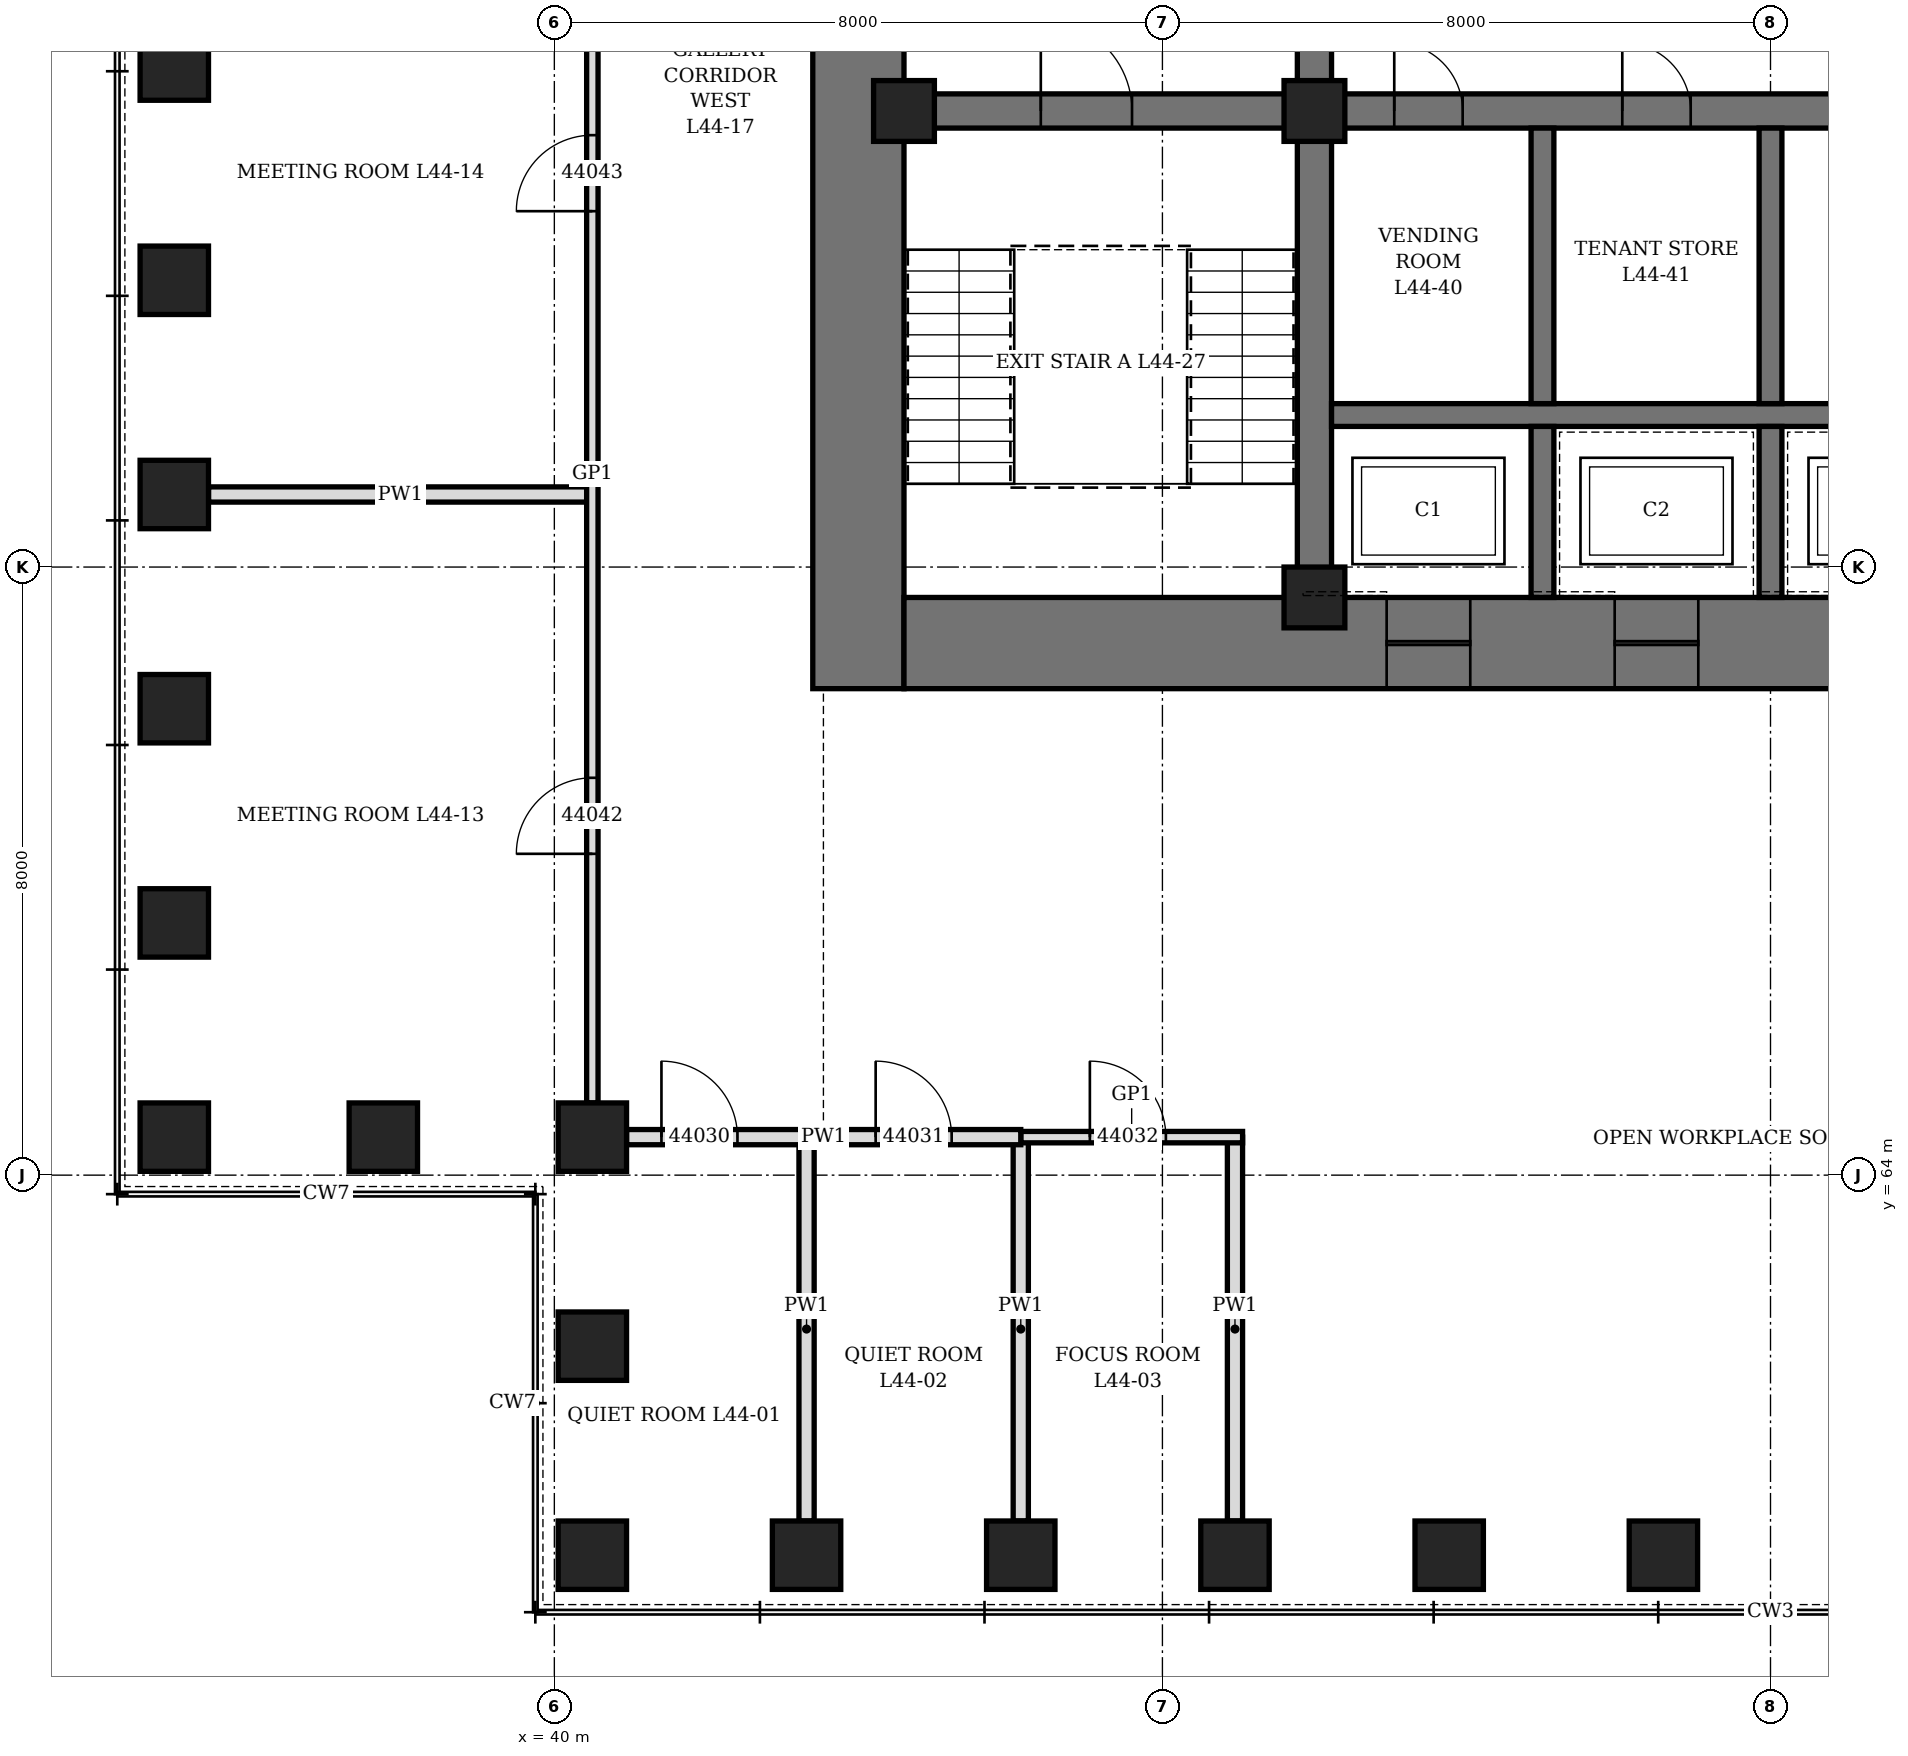
"""IFC4 building model, lengths in metres.
Left out: names, types, materials, properties, quantities, classifications, styles, units other than length and angle.
Written with IfcOpenShell. Run it as: python <this file> out.ifc"""

import sys

from ifc_helpers import new_model, si_unit, direction, frame, frame_2d, origin, origin_2d, place, context, subcontext, project, spatial, rectangle, hollow_rectangle, extrude, element, fill, save


model = new_model("IFC4")
c1 = context("Model", 3, precision=1e-05, world=origin(), true_north=direction((0.0, 1.0)))
c2 = subcontext(c1, "Body", "Model", "MODEL_VIEW")
j1 = project(units=[si_unit("LENGTHUNIT", "METRE"), si_unit("PLANEANGLEUNIT", "RADIAN")], contexts=[c1])
p1 = place(None, origin())
s1 = spatial("IfcSite", under=j1, at=p1, CompositionType="ELEMENT")
p2 = place(p1, origin())
s2 = spatial("IfcBuilding", under=s1, at=p2, CompositionType="ELEMENT")
p3 = place(p2, frame((0.0, 0.0, 198.1)))
s3 = spatial("IfcBuildingStorey", under=s2, at=p3, CompositionType="ELEMENT", Elevation=198.1)
for number, where, z_axis, x_axis in (
    (1, (40.5, 59.0, 0.0), (0.0, 0.0, 1.0), (1.0, 0.0, 0.0)),
    (2, (43.318, 59.0, 0.0), (0.0, 0.0, 1.0), (1.0, 0.0, 0.0)),
    (3, (46.136, 59.0, 0.0), (0.0, 0.0, 1.0), (1.0, 0.0, 0.0)),
    (4, (48.955, 59.0, 0.0), (0.0, 0.0, 1.0), (1.0, 0.0, 0.0)),
    (5, (51.773, 59.0, 0.0), (0.0, 0.0, 1.0), (1.0, 0.0, 0.0)),
    (6, (54.591, 59.0, 0.0), (0.0, 0.0, 1.0), (1.0, 0.0, 0.0)),
    (7, (35.0, 78.591, 0.0), (0.0, 0.0, 1.0), (0.0, 1.0, 0.0)),
    (8, (35.0, 75.773, 0.0), (0.0, 0.0, 1.0), (0.0, 1.0, 0.0)),
    (9, (35.0, 72.955, 0.0), (0.0, 0.0, 1.0), (0.0, 1.0, 0.0)),
    (10, (35.0, 70.136, 0.0), (0.0, 0.0, 1.0), (0.0, 1.0, 0.0)),
    (11, (35.0, 67.318, 0.0), (0.0, 0.0, 1.0), (0.0, 1.0, 0.0)),
    (12, (35.0, 64.5, 0.0), (0.0, 0.0, 1.0), (1.0, 0.0, 0.0)),
    (13, (37.75, 64.5, 0.0), (0.0, 0.0, 1.0), (1.0, 0.0, 0.0)),
    (14, (40.5, 64.5, 0.0), (0.0, 0.0, 1.0), (0.0, 1.0, 0.0)),
    (15, (40.5, 61.75, 0.0), (0.0, 0.0, 1.0), (0.0, 1.0, 0.0)),
):
    element("IfcColumn", number, at=place(p3, frame(where, z_axis=z_axis, x_axis=x_axis)), inside=s3, PredefinedType="COLUMN", context=c2, shape_type="SweptSolid", body=[
        extrude(hollow_rectangle(XDim=0.9, YDim=0.9, WallThickness=0.12, at=origin_2d()), origin(), (0.0, 0.0, 1.0), 4.2),
    ])
p4 = place(p3, frame((44.0, 70.4, 0.0), z_axis=(0.0, 0.0, 1.0), x_axis=(0.0, 1.0, 0.0)))
e16 = element("IfcWall", 16, at=p4, inside=s3, PredefinedType="SHEAR", context=c2, shape_type="SweptSolid", body=[
    extrude(rectangle(XDim=19.2, YDim=1.2, at=frame_2d((9.6, 0.0))), origin(), (0.0, 0.0, 1.0), 4.2),
])
p5 = place(p4, frame((8.6, 0.0, 0.0)))
e17 = element("IfcOpeningElement", 17, at=p5, cuts=e16, PredefinedType="OPENING", context=c2, shape_type="SweptSolid", body=[
    extrude(rectangle(XDim=2.0, YDim=2.4, at=frame_2d((1.0, 1.2))), frame((0.0, 0.61, 0.0), z_axis=(0.0, -1.0, 0.0), x_axis=(1.0, 0.0, 0.0)), (0.0, 0.0, 1.0), 1.22),
])
p6 = place(p3, frame((44.6, 71.0, 0.0), z_axis=(0.0, 0.0, 1.0), x_axis=(1.0, 0.0, 0.0)))
e18 = element("IfcWall", 18, at=p6, inside=s3, PredefinedType="SHEAR", context=c2, shape_type="SweptSolid", body=[
    extrude(rectangle(XDim=22.8, YDim=1.2, at=frame_2d((11.4, 0.0))), origin(), (0.0, 0.0, 1.0), 4.2),
])
p7 = place(p6, frame((6.35, 0.0, 0.0)))
e19 = element("IfcOpeningElement", 19, at=p7, cuts=e18, PredefinedType="OPENING", context=c2, shape_type="SweptSolid", body=[
    extrude(rectangle(XDim=1.1, YDim=2.2, at=frame_2d((0.55, 1.1))), frame((0.0, 0.61, 0.0), z_axis=(0.0, -1.0, 0.0), x_axis=(1.0, 0.0, 0.0)), (0.0, 0.0, 1.0), 1.22),
])
p8 = place(p6, frame((9.35, 0.0, 0.0)))
e20 = element("IfcOpeningElement", 20, at=p8, cuts=e18, PredefinedType="OPENING", context=c2, shape_type="SweptSolid", body=[
    extrude(rectangle(XDim=1.1, YDim=2.2, at=frame_2d((0.55, 1.1))), frame((0.0, 0.61, 0.0), z_axis=(0.0, -1.0, 0.0), x_axis=(1.0, 0.0, 0.0)), (0.0, 0.0, 1.0), 1.22),
])
p9 = place(p6, frame((12.35, 0.0, 0.0)))
e21 = element("IfcOpeningElement", 21, at=p9, cuts=e18, PredefinedType="OPENING", context=c2, shape_type="SweptSolid", body=[
    extrude(rectangle(XDim=1.1, YDim=2.2, at=frame_2d((0.55, 1.1))), frame((0.0, 0.61, 0.0), z_axis=(0.0, -1.0, 0.0), x_axis=(1.0, 0.0, 0.0)), (0.0, 0.0, 1.0), 1.22),
])
p10 = place(p6, frame((15.35, 0.0, 0.0)))
e22 = element("IfcOpeningElement", 22, at=p10, cuts=e18, PredefinedType="OPENING", context=c2, shape_type="SweptSolid", body=[
    extrude(rectangle(XDim=1.1, YDim=2.2, at=frame_2d((0.55, 1.1))), frame((0.0, 0.61, 0.0), z_axis=(0.0, -1.0, 0.0), x_axis=(1.0, 0.0, 0.0)), (0.0, 0.0, 1.0), 1.22),
])
p11 = place(p3, frame((50.0, 71.6, 0.0), z_axis=(0.0, 0.0, 1.0), x_axis=(0.0, 1.0, 0.0)))
e23 = element("IfcWall", 23, at=p11, inside=s3, PredefinedType="SHEAR", context=c2, shape_type="SweptSolid", body=[
    extrude(rectangle(XDim=16.8, YDim=0.45, at=frame_2d((8.4, 0.0))), origin(), (0.0, 0.0, 1.0), 4.2),
])
p12 = place(p11, frame((7.5, 0.0, 0.0)))
e24 = element("IfcOpeningElement", 24, at=p12, cuts=e23, PredefinedType="OPENING", context=c2, shape_type="SweptSolid", body=[
    extrude(rectangle(XDim=1.8, YDim=2.4, at=frame_2d((0.9, 1.2))), frame((0.0, 0.235, 0.0), z_axis=(0.0, -1.0, 0.0), x_axis=(1.0, 0.0, 0.0)), (0.0, 0.0, 1.0), 0.47),
])
p13 = place(p3, frame((44.6, 78.0, 0.0), z_axis=(0.0, 0.0, 1.0), x_axis=(1.0, 0.0, 0.0)))
e25 = element("IfcWall", 25, at=p13, inside=s3, PredefinedType="SHEAR", context=c2, shape_type="SweptSolid", body=[
    extrude(rectangle(XDim=5.175, YDim=0.45, at=frame_2d((2.587, 0.0))), origin(), (0.0, 0.0, 1.0), 4.2),
])
p14 = place(p13, frame((1.8, 0.0, 0.0)))
e26 = element("IfcOpeningElement", 26, at=p14, cuts=e25, PredefinedType="OPENING", context=c2, shape_type="SweptSolid", body=[
    extrude(rectangle(XDim=1.2, YDim=2.1, at=frame_2d((0.6, 1.05))), frame((0.0, 0.235, 0.0), z_axis=(0.0, -1.0, 0.0), x_axis=(1.0, 0.0, 0.0)), (0.0, 0.0, 1.0), 0.47),
])
p15 = place(p3, frame((50.225, 78.0, 0.0), z_axis=(0.0, 0.0, 1.0), x_axis=(1.0, 0.0, 0.0)))
e27 = element("IfcWall", 27, at=p15, inside=s3, PredefinedType="SHEAR", context=c2, shape_type="SweptSolid", body=[
    extrude(rectangle(XDim=11.55, YDim=0.45, at=frame_2d((5.775, 0.0))), origin(), (0.0, 0.0, 1.0), 4.2),
])
p16 = place(p15, frame((0.825, 0.0, 0.0)))
e28 = element("IfcOpeningElement", 28, at=p16, cuts=e27, PredefinedType="OPENING", context=c2, shape_type="SweptSolid", body=[
    extrude(rectangle(XDim=0.9, YDim=2.1, at=frame_2d((0.45, 1.05))), frame((0.0, 0.235, 0.0), z_axis=(0.0, -1.0, 0.0), x_axis=(1.0, 0.0, 0.0)), (0.0, 0.0, 1.0), 0.47),
])
p17 = place(p15, frame((3.825, 0.0, 0.0)))
e29 = element("IfcOpeningElement", 29, at=p17, cuts=e27, PredefinedType="OPENING", context=c2, shape_type="SweptSolid", body=[
    extrude(rectangle(XDim=0.9, YDim=2.1, at=frame_2d((0.45, 1.05))), frame((0.0, 0.235, 0.0), z_axis=(0.0, -1.0, 0.0), x_axis=(1.0, 0.0, 0.0)), (0.0, 0.0, 1.0), 0.47),
])
p18 = place(p15, frame((6.825, 0.0, 0.0)))
e30 = element("IfcOpeningElement", 30, at=p18, cuts=e27, PredefinedType="OPENING", context=c2, shape_type="SweptSolid", body=[
    extrude(rectangle(XDim=0.9, YDim=2.1, at=frame_2d((0.45, 1.05))), frame((0.0, 0.235, 0.0), z_axis=(0.0, -1.0, 0.0), x_axis=(1.0, 0.0, 0.0)), (0.0, 0.0, 1.0), 0.47),
])
p19 = place(p15, frame((9.825, 0.0, 0.0)))
e31 = element("IfcOpeningElement", 31, at=p19, cuts=e27, PredefinedType="OPENING", context=c2, shape_type="SweptSolid", body=[
    extrude(rectangle(XDim=0.9, YDim=2.1, at=frame_2d((0.45, 1.05))), frame((0.0, 0.235, 0.0), z_axis=(0.0, -1.0, 0.0), x_axis=(1.0, 0.0, 0.0)), (0.0, 0.0, 1.0), 0.47),
])
p20 = place(p3, frame((50.225, 74.0, 0.0), z_axis=(0.0, 0.0, 1.0), x_axis=(1.0, 0.0, 0.0)))
e32 = element("IfcWall", 32, at=p20, inside=s3, PredefinedType="SHEAR", context=c2, shape_type="SweptSolid", body=[
    extrude(rectangle(XDim=11.55, YDim=0.3, at=frame_2d((5.775, 0.0))), origin(), (0.0, 0.0, 1.0), 4.2),
])
p21 = place(p3, frame((53.0, 71.6, 0.0), z_axis=(0.0, 0.0, 1.0), x_axis=(0.0, 1.0, 0.0)))
e33 = element("IfcWall", 33, at=p21, inside=s3, PredefinedType="SHEAR", context=c2, shape_type="SweptSolid", body=[
    extrude(rectangle(XDim=2.25, YDim=0.3, at=frame_2d((1.125, 0.0))), origin(), (0.0, 0.0, 1.0), 4.2),
])
p22 = place(p3, frame((53.0, 74.15, 0.0), z_axis=(0.0, 0.0, 1.0), x_axis=(0.0, 1.0, 0.0)))
e34 = element("IfcWall", 34, at=p22, inside=s3, PredefinedType="SHEAR", context=c2, shape_type="SweptSolid", body=[
    extrude(rectangle(XDim=3.625, YDim=0.3, at=frame_2d((1.812, 0.0))), origin(), (0.0, 0.0, 1.0), 4.2),
])
p23 = place(p3, frame((56.0, 71.6, 0.0), z_axis=(0.0, 0.0, 1.0), x_axis=(0.0, 1.0, 0.0)))
e35 = element("IfcWall", 35, at=p23, inside=s3, PredefinedType="SHEAR", context=c2, shape_type="SweptSolid", body=[
    extrude(rectangle(XDim=2.25, YDim=0.3, at=frame_2d((1.125, 0.0))), origin(), (0.0, 0.0, 1.0), 4.2),
])
p24 = place(p3, frame((56.0, 74.15, 0.0), z_axis=(0.0, 0.0, 1.0), x_axis=(0.0, 1.0, 0.0)))
e36 = element("IfcWall", 36, at=p24, inside=s3, PredefinedType="SHEAR", context=c2, shape_type="SweptSolid", body=[
    extrude(rectangle(XDim=3.625, YDim=0.3, at=frame_2d((1.812, 0.0))), origin(), (0.0, 0.0, 1.0), 4.2),
])
for number, where, z_axis, x_axis in (
    (37, (44.6, 78.0, 0.0), (0.0, 0.0, 1.0), (1.0, 0.0, 0.0)),
    (38, (50.0, 71.6, 0.0), (0.0, 0.0, 1.0), (1.0, 0.0, 0.0)),
    (39, (50.0, 78.0, 0.0), (0.0, 0.0, 1.0), (1.0, 0.0, 0.0)),
):
    element("IfcColumn", number, at=place(p3, frame(where, z_axis=z_axis, x_axis=x_axis)), inside=s3, PredefinedType="COLUMN", context=c2, shape_type="SweptSolid", body=[
        extrude(hollow_rectangle(XDim=0.8, YDim=0.8, WallThickness=0.1, at=origin_2d()), origin(), (0.0, 0.0, 1.0), 4.2),
    ])
for number, where, z_axis, x_axis in (
    (40, (43.318, 59.45, 0.0), (0.0, 0.0, 1.0), (0.0, 1.0, 0.0)),
    (41, (46.136, 59.45, 0.0), (0.0, 0.0, 1.0), (0.0, 1.0, 0.0)),
    (42, (48.955, 59.45, 0.0), (0.0, 0.0, 1.0), (0.0, 1.0, 0.0)),
    (43, (35.45, 72.955, 0.0), (0.0, 0.0, 1.0), (1.0, 0.0, 0.0)),
):
    element("IfcWall", number, at=place(p3, frame(where, z_axis=z_axis, x_axis=x_axis)), inside=s3, PredefinedType="PARTITIONING", context=c2, shape_type="SweptSolid", body=[
        extrude(rectangle(XDim=5.05, YDim=0.2, at=frame_2d((2.525, 0.0))), origin(), (0.0, 0.0, 1.0), 3.428),
    ])
p25 = place(p3, frame((46.136, 64.5, 0.0), z_axis=(0.0, 0.0, 1.0), x_axis=(1.0, 0.0, 0.0)))
e44 = element("IfcWall", 44, at=p25, inside=s3, PredefinedType="PARTITIONING", context=c2, shape_type="SweptSolid", body=[
    extrude(rectangle(XDim=2.918, YDim=0.15, at=frame_2d((1.459, 0.0))), origin(), (0.0, 0.0, 1.0), 4.04),
])
p26 = place(p25, frame((0.909, 0.0, 0.0)))
e45 = element("IfcOpeningElement", 45, at=p26, cuts=e44, PredefinedType="OPENING", context=c2, shape_type="SweptSolid", body=[
    extrude(rectangle(XDim=1.0, YDim=2.4, at=frame_2d((0.5, 1.2))), frame((0.0, 0.085, 0.0), z_axis=(0.0, -1.0, 0.0), x_axis=(1.0, 0.0, 0.0)), (0.0, 0.0, 1.0), 0.17),
])
p27 = place(p3, frame((40.95, 64.5, 0.0), z_axis=(0.0, 0.0, 1.0), x_axis=(1.0, 0.0, 0.0)))
e46 = element("IfcWall", 46, at=p27, inside=s3, PredefinedType="PARTITIONING", context=c2, shape_type="SweptSolid", body=[
    extrude(rectangle(XDim=5.187, YDim=0.2, at=frame_2d((2.593, 0.0))), origin(), (0.0, 0.0, 1.0), 4.04),
])
p28 = place(p27, frame((0.459, 0.0, 0.0)))
e47 = element("IfcOpeningElement", 47, at=p28, cuts=e46, PredefinedType="OPENING", context=c2, shape_type="SweptSolid", body=[
    extrude(rectangle(XDim=1.0, YDim=2.1, at=frame_2d((0.5, 1.05))), frame((0.0, 0.11, 0.0), z_axis=(0.0, -1.0, 0.0), x_axis=(1.0, 0.0, 0.0)), (0.0, 0.0, 1.0), 0.22),
])
p29 = place(p27, frame((3.277, 0.0, 0.0)))
e48 = element("IfcOpeningElement", 48, at=p29, cuts=e46, PredefinedType="OPENING", context=c2, shape_type="SweptSolid", body=[
    extrude(rectangle(XDim=1.0, YDim=2.1, at=frame_2d((0.5, 1.05))), frame((0.0, 0.11, 0.0), z_axis=(0.0, -1.0, 0.0), x_axis=(1.0, 0.0, 0.0)), (0.0, 0.0, 1.0), 0.22),
])
p30 = place(p3, frame((40.5, 64.95, 0.0), z_axis=(0.0, 0.0, 1.0), x_axis=(0.0, 1.0, 0.0)))
e49 = element("IfcWall", 49, at=p30, inside=s3, PredefinedType="PARTITIONING", context=c2, shape_type="SweptSolid", body=[
    extrude(rectangle(XDim=16.559, YDim=0.15, at=frame_2d((8.28, 0.0))), origin(), (0.0, 0.0, 1.0), 4.04),
])
p31 = place(p30, frame((3.277, 0.0, 0.0)))
e50 = element("IfcOpeningElement", 50, at=p31, cuts=e49, PredefinedType="OPENING", context=c2, shape_type="SweptSolid", body=[
    extrude(rectangle(XDim=1.0, YDim=2.4, at=frame_2d((0.5, 1.2))), frame((0.0, 0.085, 0.0), z_axis=(0.0, -1.0, 0.0), x_axis=(1.0, 0.0, 0.0)), (0.0, 0.0, 1.0), 0.17),
])
p32 = place(p30, frame((11.732, 0.0, 0.0)))
e51 = element("IfcOpeningElement", 51, at=p32, cuts=e49, PredefinedType="OPENING", context=c2, shape_type="SweptSolid", body=[
    extrude(rectangle(XDim=1.0, YDim=2.4, at=frame_2d((0.5, 1.2))), frame((0.0, 0.085, 0.0), z_axis=(0.0, -1.0, 0.0), x_axis=(1.0, 0.0, 0.0)), (0.0, 0.0, 1.0), 0.17),
])
p33 = place(p16, origin())
e52 = element("IfcDoor", 52, at=p33, inside=s3, OperationType="SINGLE_SWING_LEFT", PredefinedType="DOOR", context=c2, shape_type="SweptSolid", body=[
    extrude(rectangle(XDim=0.9, YDim=2.1, at=frame_2d((0.45, 1.05))), frame((0.0, 0.225, 0.0), z_axis=(0.0, -1.0, 0.0), x_axis=(1.0, 0.0, 0.0)), (0.0, 0.0, 1.0), 0.449),
])
fill(e28, e52)
p34 = place(p17, origin())
e53 = element("IfcDoor", 53, at=p34, inside=s3, OperationType="SINGLE_SWING_LEFT", PredefinedType="DOOR", context=c2, shape_type="SweptSolid", body=[
    extrude(rectangle(XDim=0.9, YDim=2.1, at=frame_2d((0.45, 1.05))), frame((0.0, 0.225, 0.0), z_axis=(0.0, -1.0, 0.0), x_axis=(1.0, 0.0, 0.0)), (0.0, 0.0, 1.0), 0.449),
])
fill(e29, e53)
p35 = place(p14, origin())
e54 = element("IfcDoor", 54, at=p35, inside=s3, OperationType="SINGLE_SWING_LEFT", PredefinedType="DOOR", context=c2, shape_type="SweptSolid", body=[
    extrude(rectangle(XDim=1.2, YDim=2.1, at=frame_2d((0.6, 1.05))), frame((0.0, 0.225, 0.0), z_axis=(0.0, -1.0, 0.0), x_axis=(1.0, 0.0, 0.0)), (0.0, 0.0, 1.0), 0.449),
])
fill(e26, e54)
p36 = place(p7, origin())
e55 = element("IfcDoor", 55, at=p36, inside=s3, OperationType="SLIDING_TO_LEFT", PredefinedType="DOOR", context=c2, shape_type="SweptSolid", body=[
    extrude(rectangle(XDim=1.1, YDim=2.2, at=frame_2d((0.55, 1.1))), frame((0.0, 0.35, 0.0), z_axis=(0.0, -1.0, 0.0), x_axis=(1.0, 0.0, 0.0)), (0.0, 0.0, 1.0), 0.7),
])
fill(e19, e55)
p37 = place(p8, origin())
e56 = element("IfcDoor", 56, at=p37, inside=s3, OperationType="SLIDING_TO_LEFT", PredefinedType="DOOR", context=c2, shape_type="SweptSolid", body=[
    extrude(rectangle(XDim=1.1, YDim=2.2, at=frame_2d((0.55, 1.1))), frame((0.0, 0.35, 0.0), z_axis=(0.0, -1.0, 0.0), x_axis=(1.0, 0.0, 0.0)), (0.0, 0.0, 1.0), 0.7),
])
fill(e20, e56)
p38 = place(p28, origin())
e57 = element("IfcDoor", 57, at=p38, inside=s3, OperationType="SINGLE_SWING_LEFT", PredefinedType="DOOR", context=c2, shape_type="SweptSolid", body=[
    extrude(rectangle(XDim=1.0, YDim=2.1, at=frame_2d((0.5, 1.05))), frame((0.0, 0.1, 0.0), z_axis=(0.0, -1.0, 0.0), x_axis=(1.0, 0.0, 0.0)), (0.0, 0.0, 1.0), 0.199),
])
fill(e47, e57)
p39 = place(p29, origin())
e58 = element("IfcDoor", 58, at=p39, inside=s3, OperationType="SINGLE_SWING_LEFT", PredefinedType="DOOR", context=c2, shape_type="SweptSolid", body=[
    extrude(rectangle(XDim=1.0, YDim=2.1, at=frame_2d((0.5, 1.05))), frame((0.0, 0.1, 0.0), z_axis=(0.0, -1.0, 0.0), x_axis=(1.0, 0.0, 0.0)), (0.0, 0.0, 1.0), 0.199),
])
fill(e48, e58)
p40 = place(p26, origin())
e59 = element("IfcDoor", 59, at=p40, inside=s3, OperationType="SINGLE_SWING_RIGHT", PredefinedType="DOOR", context=c2, shape_type="SweptSolid", body=[
    extrude(rectangle(XDim=1.0, YDim=2.4, at=frame_2d((0.5, 1.2))), frame((0.0, 0.075, 0.0), z_axis=(0.0, -1.0, 0.0), x_axis=(1.0, 0.0, 0.0)), (0.0, 0.0, 1.0), 0.149),
])
fill(e45, e59)
p41 = place(p31, origin())
e60 = element("IfcDoor", 60, at=p41, inside=s3, OperationType="SINGLE_SWING_RIGHT", PredefinedType="DOOR", context=c2, shape_type="SweptSolid", body=[
    extrude(rectangle(XDim=1.0, YDim=2.4, at=frame_2d((0.5, 1.2))), frame((0.0, 0.075, 0.0), z_axis=(0.0, -1.0, 0.0), x_axis=(1.0, 0.0, 0.0)), (0.0, 0.0, 1.0), 0.149),
])
fill(e50, e60)
p42 = place(p32, origin())
e61 = element("IfcDoor", 61, at=p42, inside=s3, OperationType="SINGLE_SWING_RIGHT", PredefinedType="DOOR", context=c2, shape_type="SweptSolid", body=[
    extrude(rectangle(XDim=1.0, YDim=2.4, at=frame_2d((0.5, 1.2))), frame((0.0, 0.075, 0.0), z_axis=(0.0, -1.0, 0.0), x_axis=(1.0, 0.0, 0.0)), (0.0, 0.0, 1.0), 0.149),
])
fill(e51, e61)
save(model, sys.argv[1])
